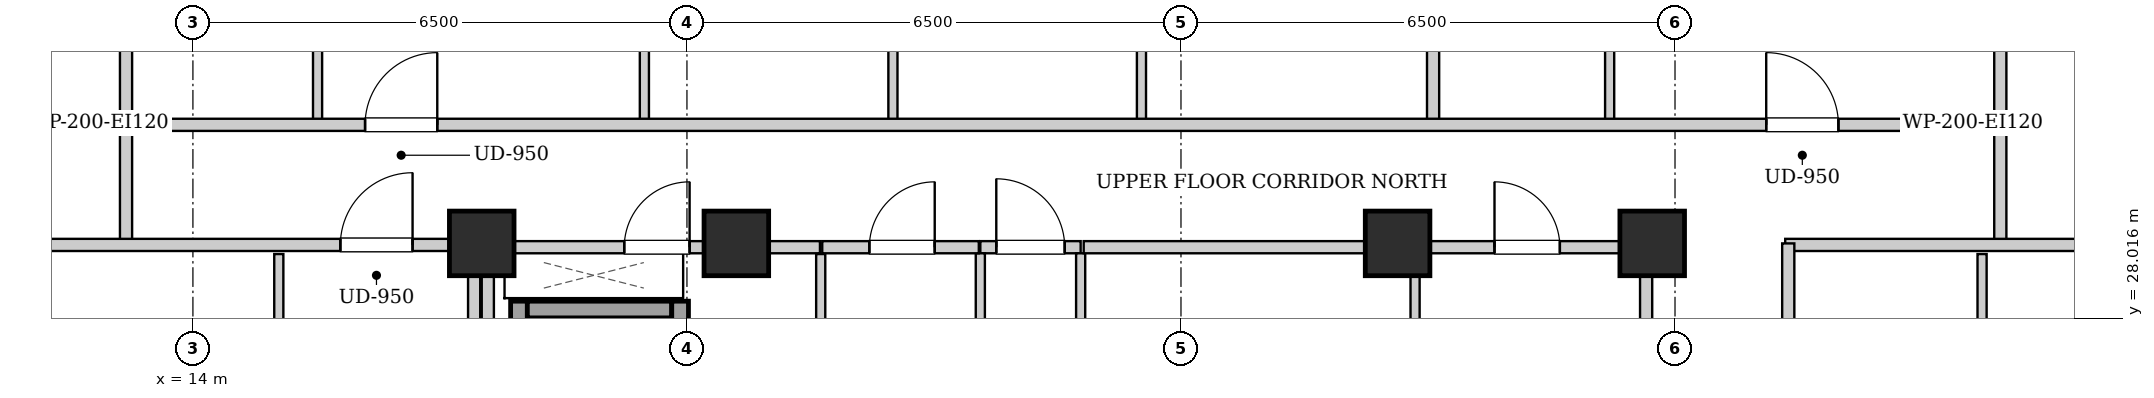
"""IFC4 building model, lengths in metres.
Left out: names, types, materials, properties, quantities, classifications, styles, units other than length and angle.
Written with IfcOpenShell. Run it as: python <this file> out.ifc"""

import sys

from ifc_helpers import new_model, si_unit, direction, frame, frame_2d, origin, origin_2d, place, context, subcontext, project, spatial, rectangle, extrude, element, fill, save


model = new_model("IFC4")
c1 = context("Model", 3, precision=1e-05, world=origin(), true_north=direction((0.0, 1.0)))
c2 = subcontext(c1, "Body", "Model", "MODEL_VIEW")
j1 = project(units=[si_unit("LENGTHUNIT", "METRE"), si_unit("PLANEANGLEUNIT", "RADIAN")], contexts=[c1])
p1 = place(None, origin())
s1 = spatial("IfcSite", under=j1, at=p1, CompositionType="ELEMENT")
p2 = place(p1, origin())
s2 = spatial("IfcBuilding", under=s1, at=p2, CompositionType="ELEMENT")
p3 = place(p2, frame((0.0, 0.0, 207.4)))
s3 = spatial("IfcBuildingStorey", under=s2, at=p3, CompositionType="ELEMENT", Elevation=207.4)
for number, where, z_axis, x_axis in (
    (1, (17.8, 29.0, 0.0), (0.0, 0.0, 1.0), (1.0, 0.0, 0.0)),
    (2, (21.15, 29.0, 0.0), (0.0, 0.0, 1.0), (1.0, 0.0, 0.0)),
    (3, (29.85, 29.0, 0.0), (0.0, 0.0, 1.0), (1.0, 0.0, 0.0)),
    (4, (33.2, 29.0, 0.0), (0.0, 0.0, 1.0), (1.0, 0.0, 0.0)),
):
    element("IfcColumn", number, at=place(p3, frame(where, z_axis=z_axis, x_axis=x_axis)), inside=s3, PredefinedType="COLUMN", context=c2, shape_type="SweptSolid", body=[
        extrude(rectangle(XDim=0.85, YDim=0.85, at=origin_2d()), origin(), (0.0, 0.0, 1.0), 3.3),
    ])
p4 = place(p3, frame((18.29, 24.1, 0.0), z_axis=(0.0, 0.0, 1.0), x_axis=(0.0, 1.0, 0.0)))
e5 = element("IfcWall", 5, at=p4, inside=s3, PredefinedType="SHEAR", context=c2, shape_type="SweptSolid", body=[
    extrude(rectangle(XDim=4.14, YDim=0.22, at=frame_2d((2.07, 0.0))), origin(), (0.0, 0.0, 1.0), 3.04),
])
p5 = place(p3, frame((18.4, 28.13, 0.0), z_axis=(0.0, 0.0, 1.0), x_axis=(1.0, 0.0, 0.0)))
e6 = element("IfcWall", 6, at=p5, inside=s3, PredefinedType="SHEAR", context=c2, shape_type="SweptSolid", body=[
    extrude(rectangle(XDim=1.9, YDim=0.22, at=frame_2d((0.95, 0.0))), origin(), (0.0, 0.0, 1.0), 3.04),
])
p6 = place(p3, frame((20.41, 26.06, 0.0), z_axis=(0.0, 0.0, 1.0), x_axis=(0.0, 1.0, 0.0)))
e7 = element("IfcWall", 7, at=p6, inside=s3, PredefinedType="SHEAR", context=c2, shape_type="SweptSolid", body=[
    extrude(rectangle(XDim=2.18, YDim=0.22, at=frame_2d((1.09, 0.0))), origin(), (0.0, 0.0, 1.0), 3.04),
])
p7 = place(p6, frame((0.54, 0.0, 0.0)))
e8 = element("IfcOpeningElement", 8, at=p7, cuts=e7, PredefinedType="OPENING", context=c2, shape_type="SweptSolid", body=[
    extrude(rectangle(XDim=1.1, YDim=2.15, at=frame_2d((0.55, 1.075))), frame((0.0, 0.12, 0.0), z_axis=(0.0, -1.0, 0.0), x_axis=(1.0, 0.0, 0.0)), (0.0, 0.0, 1.0), 0.24),
])
for number, where, z_axis, x_axis in (
    (9, (17.88, 24.12, 0.0), (0.0, 0.0, 1.0), (0.0, 1.0, 0.0)),
    (10, (33.12, 24.12, 0.0), (0.0, 0.0, 1.0), (0.0, 1.0, 0.0)),
):
    element("IfcWall", number, at=place(p3, frame(where, z_axis=z_axis, x_axis=x_axis)), inside=s3, PredefinedType="PARTITIONING", context=c2, shape_type="SweptSolid", body=[
        extrude(rectangle(XDim=4.76, YDim=0.16, at=frame_2d((2.38, 0.0))), origin(), (0.0, 0.0, 1.0), 2.375),
    ])
p8 = place(p3, frame((24.36, 28.95, 0.0), z_axis=(0.0, 0.0, 1.0), x_axis=(1.0, 0.0, 0.0)))
e11 = element("IfcWall", 11, at=p8, inside=s3, PredefinedType="PARTITIONING", context=c2, shape_type="SweptSolid", body=[
    extrude(rectangle(XDim=1.32, YDim=0.16, at=frame_2d((0.66, 0.0))), origin(), (0.0, 0.0, 1.0), 2.556),
])
p9 = place(p8, frame((0.21, 0.0, 0.0)))
e12 = element("IfcOpeningElement", 12, at=p9, cuts=e11, PredefinedType="OPENING", context=c2, shape_type="SweptSolid", body=[
    extrude(rectangle(XDim=0.9, YDim=2.05, at=frame_2d((0.45, 1.025))), frame((0.0, 0.09, 0.0), z_axis=(0.0, -1.0, 0.0), x_axis=(1.0, 0.0, 0.0)), (0.0, 0.0, 1.0), 0.18),
])
p10 = place(p3, frame((17.96, 28.95, 0.0), z_axis=(0.0, 0.0, 1.0), x_axis=(1.0, 0.0, 0.0)))
e13 = element("IfcWall", 13, at=p10, inside=s3, PredefinedType="PARTITIONING", context=c2, shape_type="SweptSolid", body=[
    extrude(rectangle(XDim=4.29, YDim=0.16, at=frame_2d((2.145, 0.0))), origin(), (0.0, 0.0, 1.0), 2.556),
])
p11 = place(p10, frame((1.715, 0.0, 0.0)))
e14 = element("IfcOpeningElement", 14, at=p11, cuts=e13, PredefinedType="OPENING", context=c2, shape_type="SweptSolid", body=[
    extrude(rectangle(XDim=0.86, YDim=2.05, at=frame_2d((0.43, 1.025))), frame((0.0, 0.09, 0.0), z_axis=(0.0, -1.0, 0.0), x_axis=(1.0, 0.0, 0.0)), (0.0, 0.0, 1.0), 0.18),
])
for number, where, z_axis, x_axis in (
    (15, (24.36, 25.0, 0.0), (0.0, 0.0, 1.0), (0.0, 1.0, 0.0)),
    (16, (25.68, 25.0, 0.0), (0.0, 0.0, 1.0), (0.0, 1.0, 0.0)),
):
    element("IfcWall", number, at=place(p3, frame(where, z_axis=z_axis, x_axis=x_axis)), inside=s3, PredefinedType="PARTITIONING", context=c2, shape_type="SweptSolid", body=[
        extrude(rectangle(XDim=3.87, YDim=0.12, at=frame_2d((1.935, 0.0))), origin(), (0.0, 0.0, 1.0), 3.04),
    ])
p12 = place(p3, frame((30.08, 26.18, 0.0), z_axis=(0.0, 0.0, 1.0), x_axis=(0.0, 1.0, 0.0)))
e17 = element("IfcWall", 17, at=p12, inside=s3, PredefinedType="PARTITIONING", context=c2, shape_type="SweptSolid", body=[
    extrude(rectangle(XDim=2.68, YDim=0.12, at=frame_2d((1.34, 0.0))), origin(), (0.0, 0.0, 1.0), 3.04),
])
p13 = place(p3, frame((30.08, 28.95, 0.0), z_axis=(0.0, 0.0, 1.0), x_axis=(1.0, 0.0, 0.0)))
e18 = element("IfcWall", 18, at=p13, inside=s3, PredefinedType="PARTITIONING", context=c2, shape_type="SweptSolid", body=[
    extrude(rectangle(XDim=2.96, YDim=0.16, at=frame_2d((1.48, 0.0))), origin(), (0.0, 0.0, 1.0), 3.04),
])
p14 = place(p13, frame((1.045, 0.0, 0.0)))
e19 = element("IfcOpeningElement", 19, at=p14, cuts=e18, PredefinedType="OPENING", context=c2, shape_type="SweptSolid", body=[
    extrude(rectangle(XDim=0.86, YDim=2.05, at=frame_2d((0.43, 1.025))), frame((0.0, 0.09, 0.0), z_axis=(0.0, -1.0, 0.0), x_axis=(1.0, 0.0, 0.0)), (0.0, 0.0, 1.0), 0.18),
])
p15 = place(p3, frame((22.26, 25.0, 0.0), z_axis=(0.0, 0.0, 1.0), x_axis=(0.0, 1.0, 0.0)))
e20 = element("IfcWall", 20, at=p15, inside=s3, PredefinedType="PARTITIONING", context=c2, shape_type="SweptSolid", body=[
    extrude(rectangle(XDim=3.86, YDim=0.12, at=frame_2d((1.93, 0.0))), origin(), (0.0, 0.0, 1.0), 3.04),
])
p16 = place(p3, frame((22.28, 28.95, 0.0), z_axis=(0.0, 0.0, 1.0), x_axis=(1.0, 0.0, 0.0)))
e21 = element("IfcWall", 21, at=p16, inside=s3, PredefinedType="PARTITIONING", context=c2, shape_type="SweptSolid", body=[
    extrude(rectangle(XDim=2.06, YDim=0.16, at=frame_2d((1.03, 0.0))), origin(), (0.0, 0.0, 1.0), 2.556),
])
p17 = place(p16, frame((0.62, 0.0, 0.0)))
e22 = element("IfcOpeningElement", 22, at=p17, cuts=e21, PredefinedType="OPENING", context=c2, shape_type="SweptSolid", body=[
    extrude(rectangle(XDim=0.86, YDim=2.05, at=frame_2d((0.43, 1.025))), frame((0.0, 0.09, 0.0), z_axis=(0.0, -1.0, 0.0), x_axis=(1.0, 0.0, 0.0)), (0.0, 0.0, 1.0), 0.18),
])
p18 = place(p3, frame((25.72, 28.95, 0.0), z_axis=(0.0, 0.0, 1.0), x_axis=(1.0, 0.0, 0.0)))
e23 = element("IfcWall", 23, at=p18, inside=s3, PredefinedType="PARTITIONING", context=c2, shape_type="SweptSolid", body=[
    extrude(rectangle(XDim=4.32, YDim=0.16, at=frame_2d((2.16, 0.0))), origin(), (0.0, 0.0, 1.0), 2.556),
])
for number, where, z_axis, x_axis in (
    (24, (13.12, 28.98, 0.0), (0.0, 0.0, 1.0), (0.0, 1.0, 0.0)),
    (25, (37.78, 28.98, 0.0), (0.0, 0.0, 1.0), (0.0, 1.0, 0.0)),
):
    element("IfcWall", number, at=place(p3, frame(where, z_axis=z_axis, x_axis=x_axis)), inside=s3, PredefinedType="PARTITIONING", context=c2, shape_type="SweptSolid", body=[
        extrude(rectangle(XDim=1.58, YDim=0.16, at=frame_2d((0.79, 0.0))), origin(), (0.0, 0.0, 1.0), 3.04),
    ])
p19 = place(p3, frame((34.95, 28.98, 0.0), z_axis=(0.0, 0.0, 1.0), x_axis=(1.0, 0.0, 0.0)))
e26 = element("IfcWall", 26, at=p19, inside=s3, PredefinedType="PARTITIONING", context=c2, shape_type="SweptSolid", body=[
    extrude(rectangle(XDim=5.07, YDim=0.16, at=frame_2d((2.535, 0.0))), origin(), (0.0, 0.0, 1.0), 2.556),
])
p20 = place(p3, frame((13.12, 30.6, 0.0), z_axis=(0.0, 0.0, 1.0), x_axis=(0.0, 1.0, 0.0)))
e27 = element("IfcWall", 27, at=p20, inside=s3, PredefinedType="PARTITIONING", context=c2, shape_type="SweptSolid", body=[
    extrude(rectangle(XDim=2.91, YDim=0.16, at=frame_2d((1.455, 0.0))), origin(), (0.0, 0.0, 1.0), 3.04),
])
p21 = place(p3, frame((15.64, 30.6, 0.0), z_axis=(0.0, 0.0, 1.0), x_axis=(0.0, 1.0, 0.0)))
e28 = element("IfcWall", 28, at=p21, inside=s3, PredefinedType="PARTITIONING", context=c2, shape_type="SweptSolid", body=[
    extrude(rectangle(XDim=2.85, YDim=0.12, at=frame_2d((1.425, 0.0))), origin(), (0.0, 0.0, 1.0), 3.04),
])
p22 = place(p21, frame((0.995, 0.0, 0.0)))
e29 = element("IfcOpeningElement", 29, at=p22, cuts=e28, PredefinedType="OPENING", context=c2, shape_type="SweptSolid", body=[
    extrude(rectangle(XDim=0.86, YDim=2.05, at=frame_2d((0.43, 1.025))), frame((0.0, 0.07, 0.0), z_axis=(0.0, -1.0, 0.0), x_axis=(1.0, 0.0, 0.0)), (0.0, 0.0, 1.0), 0.14),
])
p23 = place(p3, frame((19.94, 30.6, 0.0), z_axis=(0.0, 0.0, 1.0), x_axis=(0.0, 1.0, 0.0)))
e30 = element("IfcWall", 30, at=p23, inside=s3, PredefinedType="PARTITIONING", context=c2, shape_type="SweptSolid", body=[
    extrude(rectangle(XDim=2.85, YDim=0.12, at=frame_2d((1.425, 0.0))), origin(), (0.0, 0.0, 1.0), 3.04),
])
p24 = place(p23, frame((0.975, 0.0, 0.0)))
e31 = element("IfcOpeningElement", 31, at=p24, cuts=e30, PredefinedType="OPENING", context=c2, shape_type="SweptSolid", body=[
    extrude(rectangle(XDim=0.9, YDim=2.05, at=frame_2d((0.45, 1.025))), frame((0.0, 0.07, 0.0), z_axis=(0.0, -1.0, 0.0), x_axis=(1.0, 0.0, 0.0)), (0.0, 0.0, 1.0), 0.14),
])
p25 = place(p3, frame((23.21, 30.6, 0.0), z_axis=(0.0, 0.0, 1.0), x_axis=(0.0, 1.0, 0.0)))
e32 = element("IfcWall", 32, at=p25, inside=s3, PredefinedType="PARTITIONING", context=c2, shape_type="SweptSolid", body=[
    extrude(rectangle(XDim=2.85, YDim=0.12, at=frame_2d((1.425, 0.0))), origin(), (0.0, 0.0, 1.0), 3.04),
])
p26 = place(p25, frame((0.975, 0.0, 0.0)))
e33 = element("IfcOpeningElement", 33, at=p26, cuts=e32, PredefinedType="OPENING", context=c2, shape_type="SweptSolid", body=[
    extrude(rectangle(XDim=0.9, YDim=2.05, at=frame_2d((0.45, 1.025))), frame((0.0, 0.07, 0.0), z_axis=(0.0, -1.0, 0.0), x_axis=(1.0, 0.0, 0.0)), (0.0, 0.0, 1.0), 0.14),
])
p27 = place(p3, frame((26.48, 30.6, 0.0), z_axis=(0.0, 0.0, 1.0), x_axis=(0.0, 1.0, 0.0)))
e34 = element("IfcWall", 34, at=p27, inside=s3, PredefinedType="PARTITIONING", context=c2, shape_type="SweptSolid", body=[
    extrude(rectangle(XDim=2.85, YDim=0.12, at=frame_2d((1.425, 0.0))), origin(), (0.0, 0.0, 1.0), 3.04),
])
p28 = place(p27, frame((0.975, 0.0, 0.0)))
e35 = element("IfcOpeningElement", 35, at=p28, cuts=e34, PredefinedType="OPENING", context=c2, shape_type="SweptSolid", body=[
    extrude(rectangle(XDim=0.9, YDim=2.05, at=frame_2d((0.45, 1.025))), frame((0.0, 0.07, 0.0), z_axis=(0.0, -1.0, 0.0), x_axis=(1.0, 0.0, 0.0)), (0.0, 0.0, 1.0), 0.14),
])
p29 = place(p3, frame((37.78, 30.6, 0.0), z_axis=(0.0, 0.0, 1.0), x_axis=(0.0, 1.0, 0.0)))
e36 = element("IfcWall", 36, at=p29, inside=s3, PredefinedType="PARTITIONING", context=c2, shape_type="SweptSolid", body=[
    extrude(rectangle(XDim=2.91, YDim=0.16, at=frame_2d((1.455, 0.0))), origin(), (0.0, 0.0, 1.0), 3.04),
])
p30 = place(p3, frame((30.317, 30.6, 0.0), z_axis=(0.0, 0.0, 1.0), x_axis=(0.0, 1.0, 0.0)))
e37 = element("IfcWall", 37, at=p30, inside=s3, PredefinedType="PARTITIONING", context=c2, shape_type="SweptSolid", body=[
    extrude(rectangle(XDim=9.32, YDim=0.16, at=frame_2d((4.66, 0.0))), origin(), (0.0, 0.0, 1.0), 3.04),
])
p31 = place(p3, frame((32.64, 30.6, 0.0), z_axis=(0.0, 0.0, 1.0), x_axis=(0.0, 1.0, 0.0)))
e38 = element("IfcWall", 38, at=p31, inside=s3, PredefinedType="PARTITIONING", context=c2, shape_type="SweptSolid", body=[
    extrude(rectangle(XDim=2.85, YDim=0.12, at=frame_2d((1.425, 0.0))), origin(), (0.0, 0.0, 1.0), 3.04),
])
p32 = place(p31, frame((0.995, 0.0, 0.0)))
e39 = element("IfcOpeningElement", 39, at=p32, cuts=e38, PredefinedType="OPENING", context=c2, shape_type="SweptSolid", body=[
    extrude(rectangle(XDim=0.86, YDim=2.05, at=frame_2d((0.43, 1.025))), frame((0.0, 0.07, 0.0), z_axis=(0.0, -1.0, 0.0), x_axis=(1.0, 0.0, 0.0)), (0.0, 0.0, 1.0), 0.14),
])
p33 = place(p3, frame((10.88, 28.98, 0.0), z_axis=(0.0, 0.0, 1.0), x_axis=(1.0, 0.0, 0.0)))
e40 = element("IfcWall", 40, at=p33, inside=s3, PredefinedType="PARTITIONING", context=c2, shape_type="SweptSolid", body=[
    extrude(rectangle(XDim=6.88, YDim=0.16, at=frame_2d((3.44, 0.0))), origin(), (0.0, 0.0, 1.0), 2.556),
])
p34 = place(p33, frame((5.06, 0.0, 0.0)))
e41 = element("IfcOpeningElement", 41, at=p34, cuts=e40, PredefinedType="OPENING", context=c2, shape_type="SweptSolid", body=[
    extrude(rectangle(XDim=0.95, YDim=2.1, at=frame_2d((0.475, 1.05))), frame((0.0, 0.09, 0.0), z_axis=(0.0, -1.0, 0.0), x_axis=(1.0, 0.0, 0.0)), (0.0, 0.0, 1.0), 0.18),
])
p35 = place(p3, frame((15.13, 25.052, 0.0), z_axis=(0.0, 0.0, 1.0), x_axis=(0.0, 1.0, 0.0)))
e42 = element("IfcWall", 42, at=p35, inside=s3, PredefinedType="PARTITIONING", context=c2, shape_type="SweptSolid", body=[
    extrude(rectangle(XDim=3.808, YDim=0.12, at=frame_2d((1.904, 0.0))), origin(), (0.0, 0.0, 1.0), 3.04),
])
p36 = place(p35, frame((1.454, 0.0, 0.0)))
e43 = element("IfcOpeningElement", 43, at=p36, cuts=e42, PredefinedType="OPENING", context=c2, shape_type="SweptSolid", body=[
    extrude(rectangle(XDim=0.9, YDim=2.05, at=frame_2d((0.45, 1.025))), frame((0.0, 0.07, 0.0), z_axis=(0.0, -1.0, 0.0), x_axis=(1.0, 0.0, 0.0)), (0.0, 0.0, 1.0), 0.14),
])
p37 = place(p3, frame((37.54, 24.552, 0.0), z_axis=(0.0, 0.0, 1.0), x_axis=(0.0, 1.0, 0.0)))
e44 = element("IfcWall", 44, at=p37, inside=s3, PredefinedType="PARTITIONING", context=c2, shape_type="SweptSolid", body=[
    extrude(rectangle(XDim=4.308, YDim=0.12, at=frame_2d((2.154, 0.0))), origin(), (0.0, 0.0, 1.0), 3.04),
])
p38 = place(p37, frame((1.704, 0.0, 0.0)))
e45 = element("IfcOpeningElement", 45, at=p38, cuts=e44, PredefinedType="OPENING", context=c2, shape_type="SweptSolid", body=[
    extrude(rectangle(XDim=0.9, YDim=2.05, at=frame_2d((0.45, 1.025))), frame((0.0, 0.07, 0.0), z_axis=(0.0, -1.0, 0.0), x_axis=(1.0, 0.0, 0.0)), (0.0, 0.0, 1.0), 0.14),
])
p39 = place(p3, frame((13.15, 30.56, 0.0), z_axis=(0.0, 0.0, 1.0), x_axis=(1.0, 0.0, 0.0)))
e46 = element("IfcWall", 46, at=p39, inside=s3, PredefinedType="PARTITIONING", context=c2, shape_type="SweptSolid", body=[
    extrude(rectangle(XDim=24.6, YDim=0.16, at=frame_2d((12.3, 0.0))), origin(), (0.0, 0.0, 1.0), 3.04),
])
p40 = place(p39, frame((3.115, 0.0, 0.0)))
e47 = element("IfcOpeningElement", 47, at=p40, cuts=e46, PredefinedType="OPENING", context=c2, shape_type="SweptSolid", body=[
    extrude(rectangle(XDim=0.95, YDim=2.1, at=frame_2d((0.475, 1.05))), frame((0.0, 0.09, 0.0), z_axis=(0.0, -1.0, 0.0), x_axis=(1.0, 0.0, 0.0)), (0.0, 0.0, 1.0), 0.18),
])
p41 = place(p39, frame((21.55, 0.0, 0.0)))
e48 = element("IfcOpeningElement", 48, at=p41, cuts=e46, PredefinedType="OPENING", context=c2, shape_type="SweptSolid", body=[
    extrude(rectangle(XDim=0.95, YDim=2.1, at=frame_2d((0.475, 1.05))), frame((0.0, 0.09, 0.0), z_axis=(0.0, -1.0, 0.0), x_axis=(1.0, 0.0, 0.0)), (0.0, 0.0, 1.0), 0.18),
])
p42 = place(p3, frame((17.7, 15.02, 0.0), z_axis=(0.0, 0.0, 1.0), x_axis=(0.0, 1.0, 0.0)))
e49 = element("IfcWall", 49, at=p42, inside=s3, PredefinedType="PARTITIONING", context=c2, shape_type="SweptSolid", body=[
    extrude(rectangle(XDim=13.98, YDim=0.16, at=frame_2d((6.99, 0.0))), origin(), (0.0, 0.0, 1.0), 2.375),
])
p43 = place(p3, frame((34.99, 15.07, 0.0), z_axis=(0.0, 0.0, 1.0), x_axis=(0.0, 1.0, 0.0)))
e50 = element("IfcWall", 50, at=p43, inside=s3, PredefinedType="PARTITIONING", context=c2, shape_type="SweptSolid", body=[
    extrude(rectangle(XDim=13.93, YDim=0.16, at=frame_2d((6.965, 0.0))), origin(), (0.0, 0.0, 1.0), 3.04),
])
p44 = place(p43, frame((4.385, 0.0, 0.0)))
e51 = element("IfcOpeningElement", 51, at=p44, cuts=e50, PredefinedType="OPENING", context=c2, shape_type="SweptSolid", body=[
    extrude(rectangle(XDim=0.95, YDim=2.1, at=frame_2d((0.475, 1.05))), frame((0.0, 0.09, 0.0), z_axis=(0.0, -1.0, 0.0), x_axis=(1.0, 0.0, 0.0)), (0.0, 0.0, 1.0), 0.18),
])
p45 = place(p9, origin())
e52 = element("IfcDoor", 52, at=p45, inside=s3, OperationType="SINGLE_SWING_LEFT", PredefinedType="DOOR", context=c2, shape_type="SweptSolid", body=[
    extrude(rectangle(XDim=0.9, YDim=2.05, at=frame_2d((0.45, 1.025))), frame((0.0, 0.025, 0.0), z_axis=(0.0, -1.0, 0.0), x_axis=(1.0, 0.0, 0.0)), (0.0, 0.0, 1.0), 0.05),
])
fill(e12, e52)
p46 = place(p11, origin())
e53 = element("IfcDoor", 53, at=p46, inside=s3, OperationType="SINGLE_SWING_RIGHT", PredefinedType="DOOR", context=c2, shape_type="SweptSolid", body=[
    extrude(rectangle(XDim=0.86, YDim=2.05, at=frame_2d((0.43, 1.025))), frame((0.0, 0.025, 0.0), z_axis=(0.0, -1.0, 0.0), x_axis=(1.0, 0.0, 0.0)), (0.0, 0.0, 1.0), 0.05),
])
fill(e14, e53)
p47 = place(p14, origin())
e54 = element("IfcDoor", 54, at=p47, inside=s3, OperationType="SINGLE_SWING_LEFT", PredefinedType="DOOR", context=c2, shape_type="SweptSolid", body=[
    extrude(rectangle(XDim=0.86, YDim=2.05, at=frame_2d((0.43, 1.025))), frame((0.0, 0.025, 0.0), z_axis=(0.0, -1.0, 0.0), x_axis=(1.0, 0.0, 0.0)), (0.0, 0.0, 1.0), 0.05),
])
fill(e19, e54)
p48 = place(p17, origin())
e55 = element("IfcDoor", 55, at=p48, inside=s3, OperationType="SINGLE_SWING_RIGHT", PredefinedType="DOOR", context=c2, shape_type="SweptSolid", body=[
    extrude(rectangle(XDim=0.86, YDim=2.05, at=frame_2d((0.43, 1.025))), frame((0.0, 0.025, 0.0), z_axis=(0.0, -1.0, 0.0), x_axis=(1.0, 0.0, 0.0)), (0.0, 0.0, 1.0), 0.05),
])
fill(e22, e55)
p49 = place(p34, origin())
e56 = element("IfcDoor", 56, at=p49, inside=s3, OperationType="SINGLE_SWING_RIGHT", PredefinedType="DOOR", context=c2, shape_type="SweptSolid", body=[
    extrude(rectangle(XDim=0.95, YDim=2.1, at=frame_2d((0.475, 1.05))), frame((0.0, 0.025, 0.0), z_axis=(0.0, -1.0, 0.0), x_axis=(1.0, 0.0, 0.0)), (0.0, 0.0, 1.0), 0.05),
])
fill(e41, e56)
p50 = place(p40, origin())
e57 = element("IfcDoor", 57, at=p50, inside=s3, OperationType="SINGLE_SWING_RIGHT", PredefinedType="DOOR", context=c2, shape_type="SweptSolid", body=[
    extrude(rectangle(XDim=0.95, YDim=2.1, at=frame_2d((0.475, 1.05))), frame((0.0, 0.025, 0.0), z_axis=(0.0, -1.0, 0.0), x_axis=(1.0, 0.0, 0.0)), (0.0, 0.0, 1.0), 0.05),
])
fill(e47, e57)
p51 = place(p41, origin())
e58 = element("IfcDoor", 58, at=p51, inside=s3, OperationType="SINGLE_SWING_LEFT", PredefinedType="DOOR", context=c2, shape_type="SweptSolid", body=[
    extrude(rectangle(XDim=0.95, YDim=2.1, at=frame_2d((0.475, 1.05))), frame((0.0, 0.025, 0.0), z_axis=(0.0, -1.0, 0.0), x_axis=(1.0, 0.0, 0.0)), (0.0, 0.0, 1.0), 0.05),
])
fill(e48, e58)
save(model, sys.argv[1])
